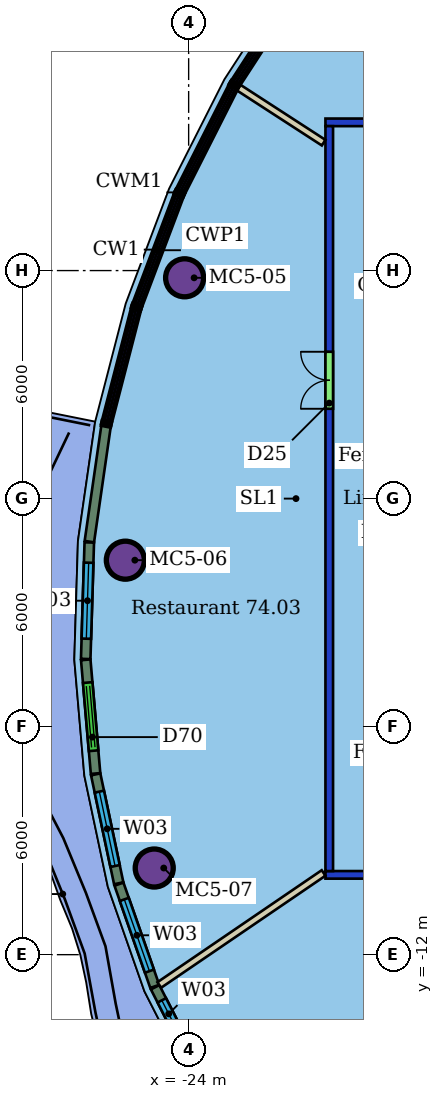
"""IFC4 building model, lengths in metres.
Left out: names, types, materials, properties, quantities, classifications, styles, units other than length and angle.
Written with IfcOpenShell. Run it as: python <this file> out.ifc"""

import sys

from ifc_helpers import new_model, si_unit, direction, frame, frame_2d, origin, origin_2d, place, context, subcontext, project, spatial, rectangle, hollow_circle, extrude, element, fill, save


model = new_model("IFC4")
c1 = context("Model", 3, precision=1e-05, world=origin(), true_north=direction((0.0, 1.0)))
c2 = subcontext(c1, "Body", "Model", "MODEL_VIEW")
j1 = project(units=[si_unit("LENGTHUNIT", "METRE"), si_unit("PLANEANGLEUNIT", "RADIAN")], contexts=[c1])
p1 = place(None, origin())
s1 = spatial("IfcSite", under=j1, at=p1, CompositionType="ELEMENT")
p2 = place(p1, origin())
s2 = spatial("IfcBuilding", under=s1, at=p2, CompositionType="ELEMENT")
p3 = place(p2, frame((0.0, 0.0, 297.3)))
s3 = spatial("IfcBuildingStorey", under=s2, at=p3, CompositionType="ELEMENT", Elevation=297.3)
for number, where, z_axis, x_axis in (
    (1, (-24.106, 5.81, 0.0), (0.0, 0.0, 1.0), (1.0, 0.0, 0.0)),
    (2, (-25.666, -1.62, 0.0), (0.0, 0.0, 1.0), (1.0, 0.0, 0.0)),
    (3, (-24.906, -9.72, 0.0), (0.0, 0.0, 1.0), (1.0, 0.0, 0.0)),
):
    element("IfcColumn", number, at=place(p3, frame(where, z_axis=z_axis, x_axis=x_axis)), inside=s3, PredefinedType="COLUMN", context=c2, shape_type="SweptSolid", body=[
        extrude(hollow_circle(Radius=0.5, WallThickness=0.04, at=origin_2d()), origin(), (0.0, 0.0, 1.0), 3.45),
    ])
p4 = place(p3, frame((8.4, -9.9, 0.0), z_axis=(0.0, 0.0, 1.0), x_axis=(-1.0, 0.0, 0.0)))
e4 = element("IfcWall", 4, at=p4, inside=s3, PredefinedType="PARTITIONING", context=c2, shape_type="SweptSolid", body=[
    extrude(rectangle(XDim=28.8, YDim=0.2, at=frame_2d((14.4, 0.0))), origin(), (0.0, 0.0, 1.0), 3.1),
])
p5 = place(p4, frame((22.465, 0.0, 0.0)))
e5 = element("IfcOpeningElement", 5, at=p5, cuts=e4, PredefinedType="OPENING", context=c2, shape_type="SweptSolid", body=[
    extrude(rectangle(XDim=1.5, YDim=2.1, at=frame_2d((0.75, 1.05))), frame((0.0, 0.11, 0.0), z_axis=(0.0, -1.0, 0.0), x_axis=(1.0, 0.0, 0.0)), (0.0, 0.0, 1.0), 0.22),
])
p6 = place(p4, frame((17.885, 0.0, 0.0)))
e6 = element("IfcOpeningElement", 6, at=p6, cuts=e4, PredefinedType="OPENING", context=c2, shape_type="SweptSolid", body=[
    extrude(rectangle(XDim=0.9, YDim=2.1, at=frame_2d((0.45, 1.05))), frame((0.0, 0.11, 0.0), z_axis=(0.0, -1.0, 0.0), x_axis=(1.0, 0.0, 0.0)), (0.0, 0.0, 1.0), 0.22),
])
p7 = place(p4, frame((9.462, 0.0, 0.0)))
e7 = element("IfcOpeningElement", 7, at=p7, cuts=e4, PredefinedType="OPENING", context=c2, shape_type="SweptSolid", body=[
    extrude(rectangle(XDim=1.5, YDim=2.1, at=frame_2d((0.75, 1.05))), frame((0.0, 0.11, 0.0), z_axis=(0.0, -1.0, 0.0), x_axis=(1.0, 0.0, 0.0)), (0.0, 0.0, 1.0), 0.22),
])
p8 = place(p3, frame((-20.3, -9.8, 0.0), z_axis=(0.0, 0.0, 1.0), x_axis=(0.0, 1.0, 0.0)))
e8 = element("IfcWall", 8, at=p8, inside=s3, PredefinedType="PARTITIONING", context=c2, shape_type="SweptSolid", body=[
    extrude(rectangle(XDim=19.6, YDim=0.2, at=frame_2d((9.8, 0.0))), origin(), (0.0, 0.0, 1.0), 3.1),
])
p9 = place(p8, frame((12.164, 0.0, 0.0)))
e9 = element("IfcOpeningElement", 9, at=p9, cuts=e8, PredefinedType="OPENING", context=c2, shape_type="SweptSolid", body=[
    extrude(rectangle(XDim=1.5, YDim=2.4, at=frame_2d((0.75, 1.2))), frame((0.0, 0.11, 0.0), z_axis=(0.0, -1.0, 0.0), x_axis=(1.0, 0.0, 0.0)), (0.0, 0.0, 1.0), 0.22),
])
p10 = place(p3, frame((-20.4, 9.9, 0.0), z_axis=(0.0, 0.0, 1.0), x_axis=(1.0, 0.0, 0.0)))
e10 = element("IfcWall", 10, at=p10, inside=s3, PredefinedType="PARTITIONING", context=c2, shape_type="SweptSolid", body=[
    extrude(rectangle(XDim=28.8, YDim=0.2, at=frame_2d((14.4, 0.0))), origin(), (0.0, 0.0, 1.0), 3.1),
])
p11 = place(p10, frame((11.686, 0.0, 0.0)))
e11 = element("IfcOpeningElement", 11, at=p11, cuts=e10, PredefinedType="OPENING", context=c2, shape_type="SweptSolid", body=[
    extrude(rectangle(XDim=1.8, YDim=2.1, at=frame_2d((0.9, 1.05))), frame((0.0, 0.11, 0.0), z_axis=(0.0, -1.0, 0.0), x_axis=(1.0, 0.0, 0.0)), (0.0, 0.0, 1.0), 0.22),
])
p12 = place(p10, frame((5.897, 0.0, 0.0)))
e12 = element("IfcOpeningElement", 12, at=p12, cuts=e10, PredefinedType="OPENING", context=c2, shape_type="SweptSolid", body=[
    extrude(rectangle(XDim=1.5, YDim=2.1, at=frame_2d((0.75, 1.05))), frame((0.0, 0.11, 0.0), z_axis=(0.0, -1.0, 0.0), x_axis=(1.0, 0.0, 0.0)), (0.0, 0.0, 1.0), 0.22),
])
p13 = place(p10, frame((19.891, 0.0, 0.0)))
e13 = element("IfcOpeningElement", 13, at=p13, cuts=e10, PredefinedType="OPENING", context=c2, shape_type="SweptSolid", body=[
    extrude(rectangle(XDim=1.5, YDim=2.4, at=frame_2d((0.75, 1.2))), frame((0.0, 0.11, 0.0), z_axis=(0.0, -1.0, 0.0), x_axis=(1.0, 0.0, 0.0)), (0.0, 0.0, 1.0), 0.22),
])
p14 = place(p3, frame((-22.691, 10.819, 0.0), z_axis=(0.0, 0.0, 1.0), x_axis=(0.839187719757, -0.543841862134, 0.0)))
e14 = element("IfcWall", 14, at=p14, inside=s3, PredefinedType="PARTITIONING", context=c2, shape_type="SweptSolid", body=[
    extrude(rectangle(XDim=2.673, YDim=0.175, at=frame_2d((1.337, 0.0))), origin(), (0.0, 0.0, 1.0), 3.45),
])
p15 = place(p3, frame((-24.772, -12.797, 0.0), z_axis=(0.0, 0.0, 1.0), x_axis=(0.826284596142, 0.563252843914, 0.0)))
e15 = element("IfcWall", 15, at=p15, inside=s3, PredefinedType="PARTITIONING", context=c2, shape_type="SweptSolid", body=[
    extrude(rectangle(XDim=5.232, YDim=0.175, at=frame_2d((2.616, 0.0))), origin(), (0.0, 0.0, 1.0), 3.45),
])
p16 = place(p3, frame((-26.173, 1.912, 0.0), z_axis=(0.0, 0.0, 1.0), x_axis=(-0.142921873415, -0.989733973399, 0.0)))
e16 = element("IfcWall", 16, at=p16, inside=s3, PredefinedType="SOLIDWALL", context=c2, shape_type="SweptSolid", body=[
    extrude(rectangle(XDim=3.075, YDim=0.25, at=frame_2d((1.537, 0.0))), origin(), (0.0, 0.0, 1.0), 3.15),
])
p17 = place(p3, frame((-26.615, -1.154, 0.0), z_axis=(0.0, 0.0, 1.0), x_axis=(-0.030643350627, -0.999530382261, 0.0)))
e17 = element("IfcWall", 17, at=p17, inside=s3, PredefinedType="SOLIDWALL", context=c2, shape_type="SweptSolid", body=[
    extrude(rectangle(XDim=3.067, YDim=0.25, at=frame_2d((1.534, 0.0))), origin(), (0.0, 0.0, 1.0), 3.15),
])
p18 = place(p17, frame((0.534, 0.0, 0.9)))
e18 = element("IfcOpeningElement", 18, at=p18, cuts=e17, PredefinedType="OPENING", context=c2, shape_type="SweptSolid", body=[
    extrude(rectangle(XDim=2.0, YDim=2.1, at=frame_2d((1.0, 1.05))), frame((0.0, 0.135, 0.0), z_axis=(0.0, -1.0, 0.0), x_axis=(1.0, 0.0, 0.0)), (0.0, 0.0, 1.0), 0.27),
])
p19 = place(p3, frame((-26.708, -4.242, 0.0), z_axis=(0.0, 0.0, 1.0), x_axis=(0.086187518859, -0.996278932625, 0.0)))
e19 = element("IfcWall", 19, at=p19, inside=s3, PredefinedType="SOLIDWALL", context=c2, shape_type="SweptSolid", body=[
    extrude(rectangle(XDim=3.003, YDim=0.25, at=frame_2d((1.501, 0.0))), origin(), (0.0, 0.0, 1.0), 3.15),
])
p20 = place(p19, frame((0.601, 0.0, 0.0)))
e20 = element("IfcOpeningElement", 20, at=p20, cuts=e19, PredefinedType="OPENING", context=c2, shape_type="SweptSolid", body=[
    extrude(rectangle(XDim=1.8, YDim=2.4, at=frame_2d((0.9, 1.2))), frame((0.0, 0.135, 0.0), z_axis=(0.0, -1.0, 0.0), x_axis=(1.0, 0.0, 0.0)), (0.0, 0.0, 1.0), 0.27),
])
p21 = place(p3, frame((-26.446, -7.256, 0.0), z_axis=(0.0, 0.0, 1.0), x_axis=(0.206909487165, -0.978360089191, 0.0)))
e21 = element("IfcWall", 21, at=p21, inside=s3, PredefinedType="SOLIDWALL", context=c2, shape_type="SweptSolid", body=[
    extrude(rectangle(XDim=2.929, YDim=0.25, at=frame_2d((1.464, 0.0))), origin(), (0.0, 0.0, 1.0), 3.15),
])
p22 = place(p21, frame((0.464, 0.0, 0.9)))
e22 = element("IfcOpeningElement", 22, at=p22, cuts=e21, PredefinedType="OPENING", context=c2, shape_type="SweptSolid", body=[
    extrude(rectangle(XDim=2.0, YDim=2.1, at=frame_2d((1.0, 1.05))), frame((0.0, 0.135, 0.0), z_axis=(0.0, -1.0, 0.0), x_axis=(1.0, 0.0, 0.0)), (0.0, 0.0, 1.0), 0.27),
])
p23 = place(p3, frame((-25.833, -10.145, 0.0), z_axis=(0.0, 0.0, 1.0), x_axis=(0.330480153195, -0.943812941395, 0.0)))
e23 = element("IfcWall", 23, at=p23, inside=s3, PredefinedType="SOLIDWALL", context=c2, shape_type="SweptSolid", body=[
    extrude(rectangle(XDim=2.85, YDim=0.25, at=frame_2d((1.425, 0.0))), origin(), (0.0, 0.0, 1.0), 3.15),
])
p24 = place(p23, frame((0.425, 0.0, 0.9)))
e24 = element("IfcOpeningElement", 24, at=p24, cuts=e23, PredefinedType="OPENING", context=c2, shape_type="SweptSolid", body=[
    extrude(rectangle(XDim=2.0, YDim=2.1, at=frame_2d((1.0, 1.05))), frame((0.0, 0.135, 0.0), z_axis=(0.0, -1.0, 0.0), x_axis=(1.0, 0.0, 0.0)), (0.0, 0.0, 1.0), 0.27),
])
p25 = place(p3, frame((-24.882, -12.858, 0.0), z_axis=(0.0, 0.0, 1.0), x_axis=(0.454701355294, -0.890643967865, 0.0)))
e25 = element("IfcWall", 25, at=p25, inside=s3, PredefinedType="SOLIDWALL", context=c2, shape_type="SweptSolid", body=[
    extrude(rectangle(XDim=2.772, YDim=0.25, at=frame_2d((1.386, 0.0))), origin(), (0.0, 0.0, 1.0), 3.15),
])
p26 = place(p25, frame((0.386, 0.0, 0.9)))
e26 = element("IfcOpeningElement", 26, at=p26, cuts=e25, PredefinedType="OPENING", context=c2, shape_type="SweptSolid", body=[
    extrude(rectangle(XDim=2.0, YDim=2.1, at=frame_2d((1.0, 1.05))), frame((0.0, 0.135, 0.0), z_axis=(0.0, -1.0, 0.0), x_axis=(1.0, 0.0, 0.0)), (0.0, 0.0, 1.0), 0.27),
])
p27 = place(p9, origin())
e27 = element("IfcDoor", 27, at=p27, inside=s3, OperationType="DOUBLE_DOOR_SINGLE_SWING", PredefinedType="DOOR", context=c2, shape_type="SweptSolid", body=[
    extrude(rectangle(XDim=1.5, YDim=2.4, at=frame_2d((0.75, 1.2))), frame((0.0, 0.025, 0.0), z_axis=(0.0, -1.0, 0.0), x_axis=(1.0, 0.0, 0.0)), (0.0, 0.0, 1.0), 0.05),
])
fill(e9, e27)
p28 = place(p18, origin())
e28 = element("IfcWindow", 28, at=p28, inside=s3, PartitioningType="SINGLE_PANEL", PredefinedType="WINDOW", context=c2, shape_type="SweptSolid", body=[
    extrude(rectangle(XDim=2.0, YDim=2.1, at=frame_2d((1.0, 1.05))), frame((0.0, 0.03, 0.0), z_axis=(0.0, -1.0, 0.0), x_axis=(1.0, 0.0, 0.0)), (0.0, 0.0, 1.0), 0.06),
])
fill(e18, e28)
p29 = place(p20, origin())
e29 = element("IfcDoor", 29, at=p29, inside=s3, OperationType="DOUBLE_DOOR_SLIDING", PredefinedType="DOOR", context=c2, shape_type="SweptSolid", body=[
    extrude(rectangle(XDim=1.8, YDim=2.4, at=frame_2d((0.9, 1.2))), frame((0.0, 0.025, 0.0), z_axis=(0.0, -1.0, 0.0), x_axis=(1.0, 0.0, 0.0)), (0.0, 0.0, 1.0), 0.05),
])
fill(e20, e29)
p30 = place(p22, origin())
e30 = element("IfcWindow", 30, at=p30, inside=s3, PartitioningType="SINGLE_PANEL", PredefinedType="WINDOW", context=c2, shape_type="SweptSolid", body=[
    extrude(rectangle(XDim=2.0, YDim=2.1, at=frame_2d((1.0, 1.05))), frame((0.0, 0.03, 0.0), z_axis=(0.0, -1.0, 0.0), x_axis=(1.0, 0.0, 0.0)), (0.0, 0.0, 1.0), 0.06),
])
fill(e22, e30)
p31 = place(p24, origin())
e31 = element("IfcWindow", 31, at=p31, inside=s3, PartitioningType="SINGLE_PANEL", PredefinedType="WINDOW", context=c2, shape_type="SweptSolid", body=[
    extrude(rectangle(XDim=2.0, YDim=2.1, at=frame_2d((1.0, 1.05))), frame((0.0, 0.03, 0.0), z_axis=(0.0, -1.0, 0.0), x_axis=(1.0, 0.0, 0.0)), (0.0, 0.0, 1.0), 0.06),
])
fill(e24, e31)
p32 = place(p26, origin())
e32 = element("IfcWindow", 32, at=p32, inside=s3, PartitioningType="SINGLE_PANEL", PredefinedType="WINDOW", context=c2, shape_type="SweptSolid", body=[
    extrude(rectangle(XDim=2.0, YDim=2.1, at=frame_2d((1.0, 1.05))), frame((0.0, 0.03, 0.0), z_axis=(0.0, -1.0, 0.0), x_axis=(1.0, 0.0, 0.0)), (0.0, 0.0, 1.0), 0.06),
])
fill(e26, e32)
save(model, sys.argv[1])
